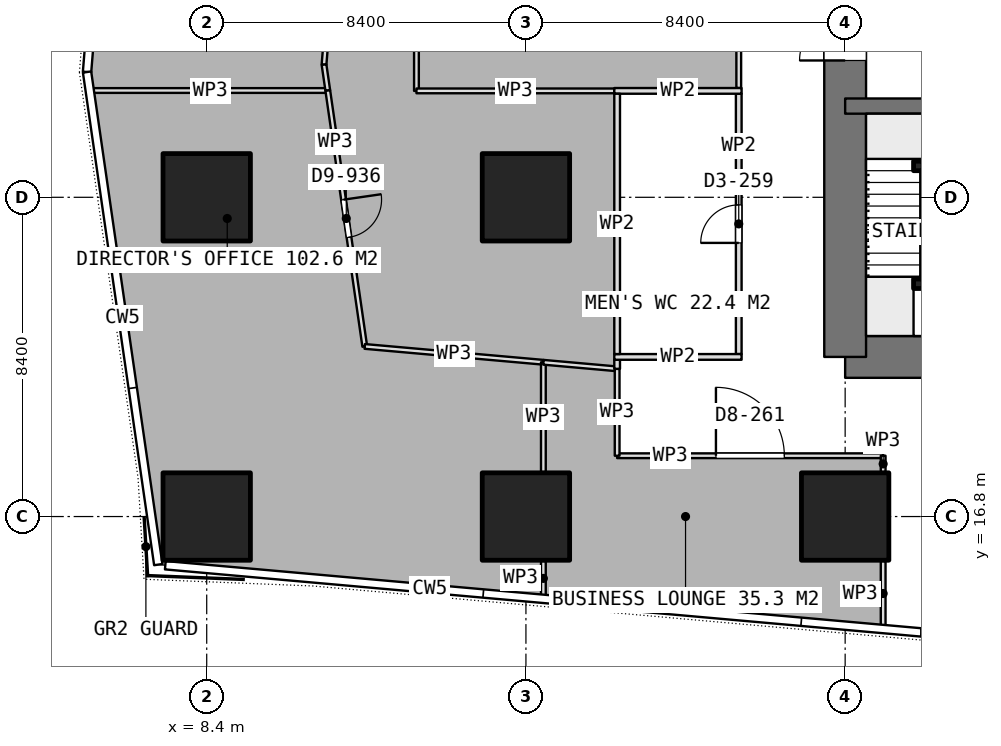
"""IFC4 building model, lengths in metres.
Left out: names, types, materials, properties, quantities, classifications, styles, units other than length and angle.
Written with IfcOpenShell. Run it as: python <this file> out.ifc"""

import sys

from ifc_helpers import new_model, si_unit, direction, frame, frame_2d, origin, origin_2d, place, context, subcontext, project, spatial, rectangle, extrude, element, fill, save


model = new_model("IFC4")
c1 = context("Model", 3, precision=1e-05, world=origin(), true_north=direction((0.0, 1.0)))
c2 = subcontext(c1, "Body", "Model", "MODEL_VIEW")
j1 = project(units=[si_unit("LENGTHUNIT", "METRE"), si_unit("PLANEANGLEUNIT", "RADIAN")], contexts=[c1])
p1 = place(None, origin())
s1 = spatial("IfcSite", under=j1, at=p1, CompositionType="ELEMENT")
p2 = place(p1, origin())
s2 = spatial("IfcBuilding", under=s1, at=p2, CompositionType="ELEMENT")
p3 = place(p2, frame((0.0, 0.0, 245.6)))
s3 = spatial("IfcBuildingStorey", under=s2, at=p3, CompositionType="ELEMENT", Elevation=245.6)
p4 = place(p3, frame((25.2, 21.0, 0.0), z_axis=(0.0, 0.0, 1.0), x_axis=(1.0, 0.0, 0.0)))
e1 = element("IfcWall", 1, at=p4, inside=s3, PredefinedType="SHEAR", context=c2, shape_type="SweptSolid", body=[
    extrude(rectangle(XDim=10.4, YDim=1.1, at=frame_2d((5.2, 0.0))), origin(), (0.0, 0.0, 1.0), 4.5),
])
p5 = place(p3, frame((25.2, 21.0, 0.0), z_axis=(0.0, 0.0, 1.0), x_axis=(0.0, 1.0, 0.0)))
e2 = element("IfcWall", 2, at=p5, inside=s3, PredefinedType="SHEAR", context=c2, shape_type="SweptSolid", body=[
    extrude(rectangle(XDim=25.2, YDim=1.1, at=frame_2d((12.6, 0.0))), origin(), (0.0, 0.0, 1.0), 4.5),
])
p6 = place(p5, frame((7.8, 0.0, 0.0)))
e3 = element("IfcOpeningElement", 3, at=p6, cuts=e2, PredefinedType="OPENING", context=c2, shape_type="SweptSolid", body=[
    extrude(rectangle(XDim=1.2, YDim=2.1, at=frame_2d((0.6, 1.05))), frame((0.0, 0.56, 0.0), z_axis=(0.0, -1.0, 0.0), x_axis=(1.0, 0.0, 0.0)), (0.0, 0.0, 1.0), 1.12),
])
p7 = place(p5, frame((14.25, 0.0, 0.0)))
e4 = element("IfcOpeningElement", 4, at=p7, cuts=e2, PredefinedType="OPENING", context=c2, shape_type="SweptSolid", body=[
    extrude(rectangle(XDim=0.9, YDim=2.1, at=frame_2d((0.45, 1.05))), frame((0.0, 0.56, 0.0), z_axis=(0.0, -1.0, 0.0), x_axis=(1.0, 0.0, 0.0)), (0.0, 0.0, 1.0), 1.12),
])
p8 = place(p5, frame((16.85, 0.0, 0.0)))
e5 = element("IfcOpeningElement", 5, at=p8, cuts=e2, PredefinedType="OPENING", context=c2, shape_type="SweptSolid", body=[
    extrude(rectangle(XDim=0.9, YDim=2.1, at=frame_2d((0.45, 1.05))), frame((0.0, 0.56, 0.0), z_axis=(0.0, -1.0, 0.0), x_axis=(1.0, 0.0, 0.0)), (0.0, 0.0, 1.0), 1.12),
])
p9 = place(p5, frame((19.0, 0.0, 0.0)))
e6 = element("IfcOpeningElement", 6, at=p9, cuts=e2, PredefinedType="OPENING", context=c2, shape_type="SweptSolid", body=[
    extrude(rectangle(XDim=1.2, YDim=2.1, at=frame_2d((0.6, 1.05))), frame((0.0, 0.56, 0.0), z_axis=(0.0, -1.0, 0.0), x_axis=(1.0, 0.0, 0.0)), (0.0, 0.0, 1.0), 1.12),
])
p10 = place(p3, frame((25.2, 27.6, 0.0), z_axis=(0.0, 0.0, 1.0), x_axis=(1.0, 0.0, 0.0)))
e7 = element("IfcWall", 7, at=p10, inside=s3, PredefinedType="SHEAR", context=c2, shape_type="SweptSolid", body=[
    extrude(rectangle(XDim=6.6, YDim=0.4, at=frame_2d((3.3, 0.0))), origin(), (0.0, 0.0, 1.0), 4.5),
])
p11 = place(p10, frame((5.0, 0.0, 0.0)))
e8 = element("IfcOpeningElement", 8, at=p11, cuts=e7, PredefinedType="OPENING", context=c2, shape_type="SweptSolid", body=[
    extrude(rectangle(XDim=1.2, YDim=2.1, at=frame_2d((0.6, 1.05))), frame((0.0, 0.21, 0.0), z_axis=(0.0, -1.0, 0.0), x_axis=(1.0, 0.0, 0.0)), (0.0, 0.0, 1.0), 0.42),
])
for number, where, z_axis, x_axis in (
    (9, (8.4, 16.8, 0.0), (0.0, 0.0, 1.0), (1.0, 0.0, 0.0)),
    (10, (8.4, 25.2, 0.0), (0.0, 0.0, 1.0), (1.0, 0.0, 0.0)),
    (11, (16.8, 16.8, 0.0), (0.0, 0.0, 1.0), (1.0, 0.0, 0.0)),
    (12, (16.8, 25.2, 0.0), (0.0, 0.0, 1.0), (1.0, 0.0, 0.0)),
    (13, (25.2, 16.8, 0.0), (0.0, 0.0, 1.0), (1.0, 0.0, 0.0)),
):
    element("IfcColumn", number, at=place(p3, frame(where, z_axis=z_axis, x_axis=x_axis)), inside=s3, PredefinedType="COLUMN", context=c2, shape_type="SweptSolid", body=[
        extrude(rectangle(XDim=2.3, YDim=2.3, at=origin_2d()), origin(), (0.0, 0.0, 1.0), 4.5),
    ])
for number, where, z_axis, x_axis in (
    (14, (19.125, 21.0, 0.0), (0.0, 0.0, 1.0), (1.0, 0.0, 0.0)),
    (15, (19.125, 28.0, 0.0), (0.0, 0.0, 1.0), (1.0, 0.0, 0.0)),
):
    element("IfcWall", number, at=place(p3, frame(where, z_axis=z_axis, x_axis=x_axis)), inside=s3, PredefinedType="PARTITIONING", context=c2, shape_type="SweptSolid", body=[
        extrude(rectangle(XDim=3.35, YDim=0.15, at=frame_2d((1.675, 0.0))), origin(), (0.0, 0.0, 1.0), 4.25),
    ])
p12 = place(p3, frame((19.2, 21.075, 0.0), z_axis=(0.0, 0.0, 1.0), x_axis=(0.0, 1.0, 0.0)))
e16 = element("IfcWall", 16, at=p12, inside=s3, PredefinedType="PARTITIONING", context=c2, shape_type="SweptSolid", body=[
    extrude(rectangle(XDim=6.85, YDim=0.15, at=frame_2d((3.425, 0.0))), origin(), (0.0, 0.0, 1.0), 4.25),
])
p13 = place(p3, frame((22.4, 21.075, 0.0), z_axis=(0.0, 0.0, 1.0), x_axis=(0.0, 1.0, 0.0)))
e17 = element("IfcWall", 17, at=p13, inside=s3, PredefinedType="PARTITIONING", context=c2, shape_type="SweptSolid", body=[
    extrude(rectangle(XDim=6.85, YDim=0.15, at=frame_2d((3.425, 0.0))), origin(), (0.0, 0.0, 1.0), 4.25),
])
p14 = place(p13, frame((2.925, 0.0, 0.0)))
e18 = element("IfcOpeningElement", 18, at=p14, cuts=e17, PredefinedType="OPENING", context=c2, shape_type="SweptSolid", body=[
    extrude(rectangle(XDim=1.0, YDim=2.1, at=frame_2d((0.5, 1.05))), frame((0.0, 0.085, 0.0), z_axis=(0.0, -1.0, 0.0), x_axis=(1.0, 0.0, 0.0)), (0.0, 0.0, 1.0), 0.17),
])
p15 = place(p3, frame((11.586, 28.01, 0.0), z_axis=(0.0, 0.0, 1.0), x_axis=(-1.0, 0.0, 0.0)))
e19 = element("IfcWall", 19, at=p15, inside=s3, PredefinedType="PARTITIONING", context=c2, shape_type="SweptSolid", body=[
    extrude(rectangle(XDim=6.184, YDim=0.125, at=frame_2d((3.092, 0.0))), origin(), (0.0, 0.0, 1.0), 4.25),
])
p16 = place(p3, frame((12.094, 36.15, 0.0), z_axis=(0.0, 0.0, 1.0), x_axis=(-0.081101425513, -0.99670585369, 0.0)))
e20 = element("IfcWall", 20, at=p16, inside=s3, PredefinedType="PARTITIONING", context=c2, shape_type="SweptSolid", body=[
    extrude(rectangle(XDim=7.484, YDim=0.125, at=frame_2d((3.742, 0.0))), origin(), (0.0, 0.0, 1.0), 4.25),
])
p17 = place(p16, frame((2.842, 0.0, 0.0)))
e21 = element("IfcOpeningElement", 21, at=p17, cuts=e20, PredefinedType="OPENING", context=c2, shape_type="SweptSolid", body=[
    extrude(rectangle(XDim=1.8, YDim=2.1, at=frame_2d((0.9, 1.05))), frame((0.0, 0.073, 0.0), z_axis=(0.0, -1.0, 0.0), x_axis=(1.0, 0.0, 0.0)), (0.0, 0.0, 1.0), 0.145),
])
p18 = place(p3, frame((11.487, 28.691, 0.0), z_axis=(0.0, 0.0, 1.0), x_axis=(0.143706083616, -0.989620412851, 0.0)))
e22 = element("IfcWall", 22, at=p18, inside=s3, PredefinedType="PARTITIONING", context=c2, shape_type="SweptSolid", body=[
    extrude(rectangle(XDim=0.688, YDim=0.125, at=frame_2d((0.344, 0.0))), origin(), (0.0, 0.0, 1.0), 4.25),
])
p19 = place(p3, frame((11.586, 28.009, 0.0), z_axis=(0.0, 0.0, 1.0), x_axis=(0.143043957939, -0.989716336178, 0.0)))
e23 = element("IfcWall", 23, at=p19, inside=s3, PredefinedType="PARTITIONING", context=c2, shape_type="SweptSolid", body=[
    extrude(rectangle(XDim=6.803, YDim=0.125, at=frame_2d((3.402, 0.0))), origin(), (0.0, 0.0, 1.0), 4.25),
])
p20 = place(p19, frame((2.901, 0.0, 0.0)))
e24 = element("IfcOpeningElement", 24, at=p20, cuts=e23, PredefinedType="OPENING", context=c2, shape_type="SweptSolid", body=[
    extrude(rectangle(XDim=1.0, YDim=2.1, at=frame_2d((0.5, 1.05))), frame((0.0, 0.073, 0.0), z_axis=(0.0, -1.0, 0.0), x_axis=(1.0, 0.0, 0.0)), (0.0, 0.0, 1.0), 0.145),
])
p21 = place(p3, frame((12.559, 21.276, 0.0), z_axis=(0.0, 0.0, 1.0), x_axis=(0.996087229523, -0.088375512338, 0.0)))
e25 = element("IfcWall", 25, at=p21, inside=s3, PredefinedType="PARTITIONING", context=c2, shape_type="SweptSolid", body=[
    extrude(rectangle(XDim=4.719, YDim=0.125, at=frame_2d((2.359, 0.0))), origin(), (0.0, 0.0, 1.0), 4.25),
])
p22 = place(p3, frame((17.259, 20.859, 0.0), z_axis=(0.0, 0.0, 1.0), x_axis=(0.0, -1.0, 0.0)))
e26 = element("IfcWall", 26, at=p22, inside=s3, PredefinedType="PARTITIONING", context=c2, shape_type="SweptSolid", body=[
    extrude(rectangle(XDim=2.889, YDim=0.125, at=frame_2d((1.444, 0.0))), origin(), (0.0, 0.0, 1.0), 4.25),
])
p23 = place(p3, frame((17.259, 15.63, 0.0), z_axis=(0.0, 0.0, 1.0), x_axis=(0.0, -1.0, 0.0)))
e27 = element("IfcWall", 27, at=p23, inside=s3, PredefinedType="PARTITIONING", context=c2, shape_type="SweptSolid", body=[
    extrude(rectangle(XDim=0.915, YDim=0.125, at=frame_2d((0.458, 0.0))), origin(), (0.0, 0.0, 1.0), 4.25),
])
p24 = place(p3, frame((19.2, 18.4, 0.0), z_axis=(0.0, 0.0, 1.0), x_axis=(1.0, 0.0, 0.0)))
e28 = element("IfcWall", 28, at=p24, inside=s3, PredefinedType="PARTITIONING", context=c2, shape_type="SweptSolid", body=[
    extrude(rectangle(XDim=7.0, YDim=0.125, at=frame_2d((3.5, 0.0))), origin(), (0.0, 0.0, 1.0), 4.25),
])
p25 = place(p24, frame((2.6, 0.0, 0.0)))
e29 = element("IfcOpeningElement", 29, at=p25, cuts=e28, PredefinedType="OPENING", context=c2, shape_type="SweptSolid", body=[
    extrude(rectangle(XDim=1.8, YDim=2.1, at=frame_2d((0.9, 1.05))), frame((0.0, 0.073, 0.0), z_axis=(0.0, -1.0, 0.0), x_axis=(1.0, 0.0, 0.0)), (0.0, 0.0, 1.0), 0.145),
])
p26 = place(p3, frame((26.2, 18.4, 0.0), z_axis=(0.0, 0.0, 1.0), x_axis=(0.0, -1.0, 0.0)))
e30 = element("IfcWall", 30, at=p26, inside=s3, PredefinedType="PARTITIONING", context=c2, shape_type="SweptSolid", body=[
    extrude(rectangle(XDim=0.43, YDim=0.125, at=frame_2d((0.215, 0.0))), origin(), (0.0, 0.0, 1.0), 4.25),
])
p27 = place(p3, frame((26.2, 15.63, 0.0), z_axis=(0.0, 0.0, 1.0), x_axis=(0.0, -1.0, 0.0)))
e31 = element("IfcWall", 31, at=p27, inside=s3, PredefinedType="PARTITIONING", context=c2, shape_type="SweptSolid", body=[
    extrude(rectangle(XDim=1.71, YDim=0.125, at=frame_2d((0.855, 0.0))), origin(), (0.0, 0.0, 1.0), 4.25),
])
p28 = place(p3, frame((17.26, 20.859, 0.0), z_axis=(0.0, 0.0, 1.0), x_axis=(0.996053947662, -0.088749835759, 0.0)))
e32 = element("IfcWall", 32, at=p28, inside=s3, PredefinedType="PARTITIONING", context=c2, shape_type="SweptSolid", body=[
    extrude(rectangle(XDim=1.948, YDim=0.125, at=frame_2d((0.974, 0.0))), origin(), (0.0, 0.0, 1.0), 4.25),
])
p29 = place(p3, frame((19.2, 20.686, 0.0), z_axis=(0.0, 0.0, 1.0), x_axis=(0.0, -1.0, 0.0)))
e33 = element("IfcWall", 33, at=p29, inside=s3, PredefinedType="PARTITIONING", context=c2, shape_type="SweptSolid", body=[
    extrude(rectangle(XDim=2.286, YDim=0.125, at=frame_2d((1.143, 0.0))), origin(), (0.0, 0.0, 1.0), 4.25),
])
p30 = place(p3, frame((13.919, 28.0, 0.0), z_axis=(0.0, 0.0, 1.0), x_axis=(0.0, 1.0, 0.0)))
e34 = element("IfcWall", 34, at=p30, inside=s3, PredefinedType="PARTITIONING", context=c2, shape_type="SweptSolid", body=[
    extrude(rectangle(XDim=8.15, YDim=0.125, at=frame_2d((4.075, 0.0))), origin(), (0.0, 0.0, 1.0), 4.25),
])
p31 = place(p3, frame((22.4, 36.15, 0.0), z_axis=(0.0, 0.0, 1.0), x_axis=(0.0, -1.0, 0.0)))
e35 = element("IfcWall", 35, at=p31, inside=s3, PredefinedType="PARTITIONING", context=c2, shape_type="SweptSolid", body=[
    extrude(rectangle(XDim=8.075, YDim=0.125, at=frame_2d((4.038, 0.0))), origin(), (0.0, 0.0, 1.0), 4.25),
])
p32 = place(p31, frame((3.175, 0.0, 0.0)))
e36 = element("IfcOpeningElement", 36, at=p32, cuts=e35, PredefinedType="OPENING", context=c2, shape_type="SweptSolid", body=[
    extrude(rectangle(XDim=1.8, YDim=2.1, at=frame_2d((0.9, 1.05))), frame((0.0, 0.073, 0.0), z_axis=(0.0, -1.0, 0.0), x_axis=(1.0, 0.0, 0.0)), (0.0, 0.0, 1.0), 0.145),
])
p33 = place(p3, frame((19.125, 28.0, 0.0), z_axis=(0.0, 0.0, 1.0), x_axis=(-1.0, 0.0, 0.0)))
e37 = element("IfcWall", 37, at=p33, inside=s3, PredefinedType="PARTITIONING", context=c2, shape_type="SweptSolid", body=[
    extrude(rectangle(XDim=5.206, YDim=0.125, at=frame_2d((2.603, 0.0))), origin(), (0.0, 0.0, 1.0), 4.25),
])
p34 = place(p3, frame((19.2, 20.925, 0.0), z_axis=(0.0, 0.0, 1.0), x_axis=(0.0, -1.0, 0.0)))
e38 = element("IfcWall", 38, at=p34, inside=s3, PredefinedType="PARTITIONING", context=c2, shape_type="SweptSolid", body=[
    extrude(rectangle(XDim=0.239, YDim=0.15, at=frame_2d((0.12, 0.0))), origin(), (0.0, 0.0, 1.0), 4.25),
])
for number, where, z_axis, x_axis in (
    (39, (27.125, 22.925, 0.0), (0.0, 0.0, 1.0), (1.0, 0.0, 0.0)),
    (40, (27.125, 26.025, 0.0), (0.0, 0.0, 1.0), (1.0, 0.0, 0.0)),
):
    element("IfcColumn", number, at=place(p3, frame(where, z_axis=z_axis, x_axis=x_axis)), inside=s3, PredefinedType="COLUMN", context=c2, shape_type="SweptSolid", body=[
        extrude(rectangle(XDim=0.25, YDim=0.25, at=origin_2d()), origin(), (0.0, 0.0, 1.0), 4.5),
    ])
p35 = place(p6, origin())
e41 = element("IfcDoor", 41, at=p35, inside=s3, OperationType="SINGLE_SWING_LEFT", PredefinedType="DOOR", context=c2, shape_type="SweptSolid", body=[
    extrude(rectangle(XDim=1.2, YDim=2.1, at=frame_2d((0.6, 1.05))), frame((0.0, 0.025, 0.0), z_axis=(0.0, -1.0, 0.0), x_axis=(1.0, 0.0, 0.0)), (0.0, 0.0, 1.0), 0.05),
])
fill(e3, e41)
p36 = place(p14, origin())
e42 = element("IfcDoor", 42, at=p36, inside=s3, OperationType="SINGLE_SWING_LEFT", PredefinedType="DOOR", context=c2, shape_type="SweptSolid", body=[
    extrude(rectangle(XDim=1.0, YDim=2.1, at=frame_2d((0.5, 1.05))), frame((0.0, 0.025, 0.0), z_axis=(0.0, -1.0, 0.0), x_axis=(1.0, 0.0, 0.0)), (0.0, 0.0, 1.0), 0.05),
])
fill(e18, e42)
p37 = place(p20, origin())
e43 = element("IfcDoor", 43, at=p37, inside=s3, OperationType="SINGLE_SWING_LEFT", PredefinedType="DOOR", context=c2, shape_type="SweptSolid", body=[
    extrude(rectangle(XDim=1.0, YDim=2.1, at=frame_2d((0.5, 1.05))), frame((0.0, 0.025, 0.0), z_axis=(0.0, -1.0, 0.0), x_axis=(1.0, 0.0, 0.0)), (0.0, 0.0, 1.0), 0.05),
])
fill(e24, e43)
p38 = place(p25, origin())
e44 = element("IfcDoor", 44, at=p38, inside=s3, OperationType="DOUBLE_DOOR_SINGLE_SWING", PredefinedType="DOOR", context=c2, shape_type="SweptSolid", body=[
    extrude(rectangle(XDim=1.8, YDim=2.1, at=frame_2d((0.9, 1.05))), frame((0.0, 0.025, 0.0), z_axis=(0.0, -1.0, 0.0), x_axis=(1.0, 0.0, 0.0)), (0.0, 0.0, 1.0), 0.05),
])
fill(e29, e44)
save(model, sys.argv[1])
